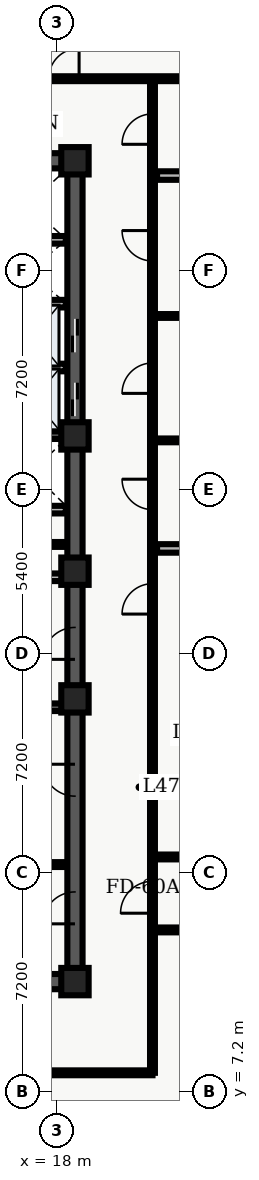
"""IFC4 building model, lengths in metres.
Left out: names, types, materials, properties, quantities, classifications, styles, units other than length and angle.
Written with IfcOpenShell. Run it as: python <this file> out.ifc"""

import sys

from ifc_helpers import new_model, entity, si_unit, converted_unit, direction, frame, origin_with_axes, origin_2d_with_axis, place, context, subcontext, project, spatial, polyline, rectangle, outline, extrude, element, fill, save


model = new_model("IFC4")
c1 = context("Model", 3, precision=1e-05, world=origin_with_axes(), true_north=direction((0.0, 1.0)))
c2 = subcontext(c1, "Body", "Model", "MODEL_VIEW")
j1 = project(units=[si_unit("LENGTHUNIT", "METRE"), converted_unit("PLANEANGLEUNIT", "DEGREE", entity("IfcPlaneAngleMeasure", 0.017), si_unit("PLANEANGLEUNIT", "RADIAN"), dimensions=[0, 0, 0, 0, 0, 0, 0])], contexts=[c1])
p1 = place(None, origin_with_axes())
s1 = spatial("IfcSite", under=j1, at=p1, CompositionType="ELEMENT")
p2 = place(p1, origin_with_axes())
s2 = spatial("IfcBuilding", under=s1, at=p2, CompositionType="ELEMENT")
p3 = place(p2, frame((0.0, 0.0, 192.6), z_axis=(0.0, 0.0, 1.0), x_axis=(1.0, 0.0, 0.0)))
s3 = spatial("IfcBuildingStorey", under=s2, at=p3, CompositionType="ELEMENT", Elevation=192.6)
p4 = place(p3, frame((11.4, 10.8, 0.0), z_axis=(0.0, 0.0, 1.0), x_axis=(1.0, 0.0, 0.0)))
e1 = element("IfcWall", 1, at=p4, inside=s3, PredefinedType="SHEAR", context=c2, shape_type="SweptSolid", body=[
    extrude(outline(polyline([(0.0, -0.25), (7.2, -0.25), (7.2, 0.25), (0.0, 0.25), (0.0, -0.25)])), origin_with_axes(), (0.0, 0.0, 1.0), 3.66),
])
p5 = place(p4, frame((2.625, 0.0, 0.0), z_axis=(0.0, 0.0, 1.0), x_axis=(1.0, 0.0, 0.0)))
e2 = element("IfcOpeningElement", 2, at=p5, cuts=e1, PredefinedType="OPENING", context=c2, shape_type="SweptSolid", body=[
    extrude(rectangle(XDim=1.05, YDim=0.52, at=origin_2d_with_axis()), origin_with_axes(), (0.0, 0.0, 1.0), 2.15),
])
p6 = place(p3, frame((11.4, 37.8, 0.0), z_axis=(0.0, 0.0, 1.0), x_axis=(1.0, 0.0, 0.0)))
e3 = element("IfcWall", 3, at=p6, inside=s3, PredefinedType="SHEAR", context=c2, shape_type="SweptSolid", body=[
    extrude(outline(polyline([(0.0, -0.25), (7.2, -0.25), (7.2, 0.25), (0.0, 0.25), (0.0, -0.25)])), origin_with_axes(), (0.0, 0.0, 1.0), 3.66),
])
p7 = place(p6, frame((2.625, 0.0, 0.0), z_axis=(0.0, 0.0, 1.0), x_axis=(1.0, 0.0, 0.0)))
e4 = element("IfcOpeningElement", 4, at=p7, cuts=e3, PredefinedType="OPENING", context=c2, shape_type="SweptSolid", body=[
    extrude(rectangle(XDim=1.05, YDim=0.52, at=origin_2d_with_axis()), origin_with_axes(), (0.0, 0.0, 1.0), 2.15),
])
p8 = place(p3, frame((18.6, 10.8, 0.0), z_axis=(0.0, 0.0, 1.0), x_axis=(0.0, 1.0, 0.0)))
e5 = element("IfcWall", 5, at=p8, inside=s3, PredefinedType="SHEAR", context=c2, shape_type="SweptSolid", body=[
    extrude(outline(polyline([(0.0, -0.25), (13.5, -0.25), (13.5, 0.25), (0.0, 0.25), (0.0, -0.25)])), origin_with_axes(), (0.0, 0.0, 1.0), 3.66),
])
p9 = place(p8, frame((11.125, 0.0, 0.0), z_axis=(0.0, 0.0, 1.0), x_axis=(1.0, 0.0, 0.0)))
e6 = element("IfcOpeningElement", 6, at=p9, cuts=e5, PredefinedType="OPENING", context=c2, shape_type="SweptSolid", body=[
    extrude(rectangle(XDim=1.05, YDim=0.52, at=origin_2d_with_axis()), origin_with_axes(), (0.0, 0.0, 1.0), 2.15),
])
p10 = place(p8, frame((2.425, 0.0, 0.0), z_axis=(0.0, 0.0, 1.0), x_axis=(1.0, 0.0, 0.0)))
e7 = element("IfcOpeningElement", 7, at=p10, cuts=e5, PredefinedType="OPENING", context=c2, shape_type="SweptSolid", body=[
    extrude(rectangle(XDim=1.05, YDim=0.52, at=origin_2d_with_axis()), origin_with_axes(), (0.0, 0.0, 1.0), 2.15),
])
p11 = place(p8, frame((6.625, 0.0, 0.0), z_axis=(0.0, 0.0, 1.0), x_axis=(1.0, 0.0, 0.0)))
e8 = element("IfcOpeningElement", 8, at=p11, cuts=e5, PredefinedType="OPENING", context=c2, shape_type="SweptSolid", body=[
    extrude(rectangle(XDim=1.05, YDim=0.52, at=origin_2d_with_axis()), origin_with_axes(), (0.0, 0.0, 1.0), 2.15),
])
p12 = place(p3, frame((18.6, 24.3, 0.0), z_axis=(0.0, 0.0, 1.0), x_axis=(0.0, 1.0, 0.0)))
e9 = element("IfcWall", 9, at=p12, inside=s3, PredefinedType="SHEAR", context=c2, shape_type="SweptSolid", body=[
    extrude(outline(polyline([(0.0, -0.25), (13.5, -0.25), (13.5, 0.25), (0.0, 0.25), (0.0, -0.25)])), origin_with_axes(), (0.0, 0.0, 1.0), 3.66),
])
p13 = place(p12, frame((5.65, 0.0, 0.0), z_axis=(0.0, 0.0, 1.0), x_axis=(1.0, 0.0, 0.0)))
e10 = element("IfcOpeningElement", 10, at=p13, cuts=e9, PredefinedType="OPENING", context=c2, shape_type="SweptSolid", body=[
    extrude(rectangle(XDim=1.1, YDim=0.52, at=origin_2d_with_axis()), origin_with_axes(), (0.0, 0.0, 1.0), 2.15),
])
p14 = place(p12, frame((7.75, 0.0, 0.0), z_axis=(0.0, 0.0, 1.0), x_axis=(1.0, 0.0, 0.0)))
e11 = element("IfcOpeningElement", 11, at=p14, cuts=e9, PredefinedType="OPENING", context=c2, shape_type="SweptSolid", body=[
    extrude(rectangle(XDim=1.1, YDim=0.52, at=origin_2d_with_axis()), origin_with_axes(), (0.0, 0.0, 1.0), 2.15),
])
for number, where, z_axis, x_axis in (
    (12, (11.65, 19.825, 0.0), (0.0, 0.0, 1.0), (1.0, 0.0, 0.0)),
    (13, (11.65, 28.775, 0.0), (0.0, 0.0, 1.0), (1.0, 0.0, 0.0)),
):
    element("IfcWall", number, at=place(p3, frame(where, z_axis=z_axis, x_axis=x_axis)), inside=s3, PredefinedType="SHEAR", context=c2, shape_type="SweptSolid", body=[
        extrude(outline(polyline([(0.0, -0.125), (6.7, -0.125), (6.7, 0.125), (0.0, 0.125), (0.0, -0.125)])), origin_with_axes(), (0.0, 0.0, 1.0), 3.66),
    ])
p15 = place(p3, frame((11.7, 24.1, 0.0), z_axis=(0.0, 0.0, 1.0), x_axis=(1.0, 0.0, 0.0)))
e14 = element("IfcWall", 14, at=p15, inside=s3, PredefinedType="SOLIDWALL", context=c2, shape_type="SweptSolid", body=[
    extrude(outline(polyline([(0.0, -0.125), (6.6, -0.125), (6.6, 0.125), (0.0, 0.125), (0.0, -0.125)])), origin_with_axes(), (0.0, 0.0, 1.0), 2.7),
])
p16 = place(p15, frame((3.75, 0.0, 0.0), z_axis=(0.0, 0.0, 1.0), x_axis=(1.0, 0.0, 0.0)))
e15 = element("IfcOpeningElement", 15, at=p16, cuts=e14, PredefinedType="OPENING", context=c2, shape_type="SweptSolid", body=[
    extrude(rectangle(XDim=0.9, YDim=0.27, at=origin_2d_with_axis()), origin_with_axes(), (0.0, 0.0, 1.0), 2.15),
])
p17 = place(p3, frame((11.7, 26.325, 0.0), z_axis=(0.0, 0.0, 1.0), x_axis=(1.0, 0.0, 0.0)))
e16 = element("IfcWall", 16, at=p17, inside=s3, PredefinedType="SOLIDWALL", context=c2, shape_type="SweptSolid", body=[
    extrude(outline(polyline([(0.0, -0.125), (6.6, -0.125), (6.6, 0.125), (0.0, 0.125), (0.0, -0.125)])), origin_with_axes(), (0.0, 0.0, 1.0), 2.7),
])
p18 = place(p17, frame((3.5, 0.0, 0.0), z_axis=(0.0, 0.0, 1.0), x_axis=(1.0, 0.0, 0.0)))
e17 = element("IfcOpeningElement", 17, at=p18, cuts=e16, PredefinedType="OPENING", context=c2, shape_type="SweptSolid", body=[
    extrude(rectangle(XDim=0.9, YDim=0.27, at=origin_2d_with_axis()), origin_with_axes(), (0.0, 0.0, 1.0), 2.15),
])
for number, where, z_axis, x_axis in (
    (18, (18.6, 10.8, 0.0), (0.0, 0.0, 1.0), (1.0, 0.0, 0.0)),
    (19, (18.6, 20.1, 0.0), (0.0, 0.0, 1.0), (1.0, 0.0, 0.0)),
    (20, (18.6, 24.3, 0.0), (0.0, 0.0, 1.0), (1.0, 0.0, 0.0)),
    (21, (18.6, 28.75, 0.0), (0.0, 0.0, 1.0), (1.0, 0.0, 0.0)),
    (22, (18.6, 37.8, 0.0), (0.0, 0.0, 1.0), (1.0, 0.0, 0.0)),
):
    element("IfcColumn", number, at=place(p3, frame(where, z_axis=z_axis, x_axis=x_axis)), inside=s3, PredefinedType="COLUMN", context=c2, shape_type="SweptSolid", body=[
        extrude(rectangle(XDim=0.9, YDim=0.9, at=origin_2d_with_axis()), origin_with_axes(), (0.0, 0.0, 1.0), 3.9),
    ])
p19 = place(p3, frame((14.62, 25.18, 0.0), z_axis=(0.0, 0.0, 1.0), x_axis=(1.0, 0.0, 0.0)))
e23 = element("IfcWall", 23, at=p19, inside=s3, PredefinedType="PARTITIONING", context=c2, shape_type="SweptSolid", body=[
    extrude(outline(polyline([(0.0, -0.08), (3.68, -0.08), (3.68, 0.08), (0.0, 0.08), (0.0, -0.08)])), origin_with_axes(), (0.0, 0.0, 1.0), 2.7),
])
p20 = place(p19, frame((1.95, 0.0, 0.0), z_axis=(0.0, 0.0, 1.0), x_axis=(1.0, 0.0, 0.0)))
e24 = element("IfcOpeningElement", 24, at=p20, cuts=e23, PredefinedType="OPENING", context=c2, shape_type="SweptSolid", body=[
    extrude(rectangle(XDim=0.9, YDim=0.18, at=origin_2d_with_axis()), origin_with_axes(), (0.0, 0.0, 1.0), 2.15),
])
p21 = place(p3, frame((15.84, 14.65, 0.0), z_axis=(0.0, 0.0, 1.0), x_axis=(1.0, 0.0, 0.0)))
e25 = element("IfcWall", 25, at=p21, inside=s3, PredefinedType="PARTITIONING", context=c2, shape_type="SweptSolid", body=[
    extrude(outline(polyline([(0.0, -0.08), (2.46, -0.08), (2.46, 0.08), (0.0, 0.08), (0.0, -0.08)])), origin_with_axes(), (0.0, 0.0, 1.0), 2.7),
])
for number, where, z_axis, x_axis in (
    (26, (15.84, 31.0, 0.0), (0.0, 0.0, 1.0), (1.0, 0.0, 0.0)),
    (27, (15.84, 33.1, 0.0), (0.0, 0.0, 1.0), (1.0, 0.0, 0.0)),
    (28, (15.84, 35.2, 0.0), (0.0, 0.0, 1.0), (1.0, 0.0, 0.0)),
):
    element("IfcWall", number, at=place(p3, frame(where, z_axis=z_axis, x_axis=x_axis)), inside=s3, PredefinedType="SOLIDWALL", context=c2, shape_type="SweptSolid", body=[
        extrude(outline(polyline([(0.0, -0.125), (2.46, -0.125), (2.46, 0.125), (0.0, 0.125), (0.0, -0.125)])), origin_with_axes(), (0.0, 0.0, 1.0), 2.7),
    ])
p22 = place(p3, frame((2.6, 7.8, 0.0), z_axis=(0.0, 0.0, 1.0), x_axis=(1.0, 0.0, 0.0)))
e29 = element("IfcWall", 29, at=p22, inside=s3, PredefinedType="PARTITIONING", context=c2, shape_type="SweptSolid", body=[
    extrude(outline(polyline([(0.0, -0.08), (18.55, -0.08), (18.55, 0.08), (0.0, 0.08), (0.0, -0.08)])), origin_with_axes(), (0.0, 0.0, 1.0), 2.7),
])
p23 = place(p22, frame((5.04, 0.0, 0.0), z_axis=(0.0, 0.0, 1.0), x_axis=(1.0, 0.0, 0.0)))
e30 = element("IfcOpeningElement", 30, at=p23, cuts=e29, PredefinedType="OPENING", context=c2, shape_type="SweptSolid", body=[
    extrude(rectangle(XDim=1.2, YDim=0.18, at=origin_2d_with_axis()), origin_with_axes(), (0.0, 0.0, 1.0), 2.2),
])
p24 = place(p22, frame((13.415, 0.0, 0.0), z_axis=(0.0, 0.0, 1.0), x_axis=(1.0, 0.0, 0.0)))
e31 = element("IfcOpeningElement", 31, at=p24, cuts=e29, PredefinedType="OPENING", context=c2, shape_type="SweptSolid", body=[
    extrude(rectangle(XDim=1.0, YDim=0.18, at=origin_2d_with_axis()), origin_with_axes(), (0.0, 0.0, 1.0), 2.15),
])
p25 = place(p3, frame((2.6, 40.5, 0.0), z_axis=(0.0, 0.0, 1.0), x_axis=(1.0, 0.0, 0.0)))
e32 = element("IfcWall", 32, at=p25, inside=s3, PredefinedType="PARTITIONING", context=c2, shape_type="SweptSolid", body=[
    extrude(outline(polyline([(0.0, -0.08), (24.746, -0.08), (24.746, 0.08), (0.0, 0.08), (0.0, -0.08)])), origin_with_axes(), (0.0, 0.0, 1.0), 2.7),
])
p26 = place(p25, frame((1.554, 0.0, 0.0), z_axis=(0.0, 0.0, 1.0), x_axis=(1.0, 0.0, 0.0)))
e33 = element("IfcOpeningElement", 33, at=p26, cuts=e32, PredefinedType="OPENING", context=c2, shape_type="SweptSolid", body=[
    extrude(rectangle(XDim=1.0, YDim=0.18, at=origin_2d_with_axis()), origin_with_axes(), (0.0, 0.0, 1.0), 2.15),
])
p27 = place(p25, frame((6.84, 0.0, 0.0), z_axis=(0.0, 0.0, 1.0), x_axis=(1.0, 0.0, 0.0)))
e34 = element("IfcOpeningElement", 34, at=p27, cuts=e32, PredefinedType="OPENING", context=c2, shape_type="SweptSolid", body=[
    extrude(rectangle(XDim=1.0, YDim=0.18, at=origin_2d_with_axis()), origin_with_axes(), (0.0, 0.0, 1.0), 2.15),
])
p28 = place(p25, frame((11.276, 0.0, 0.0), z_axis=(0.0, 0.0, 1.0), x_axis=(1.0, 0.0, 0.0)))
e35 = element("IfcOpeningElement", 35, at=p28, cuts=e32, PredefinedType="OPENING", context=c2, shape_type="SweptSolid", body=[
    extrude(rectangle(XDim=1.0, YDim=0.18, at=origin_2d_with_axis()), origin_with_axes(), (0.0, 0.0, 1.0), 2.15),
])
p29 = place(p25, frame((15.636, 0.0, 0.0), z_axis=(0.0, 0.0, 1.0), x_axis=(1.0, 0.0, 0.0)))
e36 = element("IfcOpeningElement", 36, at=p29, cuts=e32, PredefinedType="OPENING", context=c2, shape_type="SweptSolid", body=[
    extrude(rectangle(XDim=1.0, YDim=0.18, at=origin_2d_with_axis()), origin_with_axes(), (0.0, 0.0, 1.0), 2.15),
])
p30 = place(p3, frame((21.15, 7.8, 0.0), z_axis=(0.0, 0.0, 1.0), x_axis=(0.0, 1.0, 0.0)))
e37 = element("IfcWall", 37, at=p30, inside=s3, PredefinedType="PARTITIONING", context=c2, shape_type="SweptSolid", body=[
    extrude(outline(polyline([(0.0, -0.08), (32.7, -0.08), (32.7, 0.08), (0.0, 0.08), (0.0, -0.08)])), origin_with_axes(), (0.0, 0.0, 1.0), 2.7),
])
p31 = place(p30, frame((15.589, 0.0, 0.0), z_axis=(0.0, 0.0, 1.0), x_axis=(1.0, 0.0, 0.0)))
e38 = element("IfcOpeningElement", 38, at=p31, cuts=e37, PredefinedType="OPENING", context=c2, shape_type="SweptSolid", body=[
    extrude(rectangle(XDim=1.0, YDim=0.18, at=origin_2d_with_axis()), origin_with_axes(), (0.0, 0.0, 1.0), 2.15),
])
p32 = place(p30, frame((19.026, 0.0, 0.0), z_axis=(0.0, 0.0, 1.0), x_axis=(1.0, 0.0, 0.0)))
e39 = element("IfcOpeningElement", 39, at=p32, cuts=e37, PredefinedType="OPENING", context=c2, shape_type="SweptSolid", body=[
    extrude(rectangle(XDim=1.0, YDim=0.18, at=origin_2d_with_axis()), origin_with_axes(), (0.0, 0.0, 1.0), 2.15),
])
p33 = place(p30, frame((22.849, 0.0, 0.0), z_axis=(0.0, 0.0, 1.0), x_axis=(1.0, 0.0, 0.0)))
e40 = element("IfcOpeningElement", 40, at=p33, cuts=e37, PredefinedType="OPENING", context=c2, shape_type="SweptSolid", body=[
    extrude(rectangle(XDim=1.0, YDim=0.18, at=origin_2d_with_axis()), origin_with_axes(), (0.0, 0.0, 1.0), 2.15),
])
p34 = place(p30, frame((27.204, 0.0, 0.0), z_axis=(0.0, 0.0, 1.0), x_axis=(1.0, 0.0, 0.0)))
e41 = element("IfcOpeningElement", 41, at=p34, cuts=e37, PredefinedType="OPENING", context=c2, shape_type="SweptSolid", body=[
    extrude(rectangle(XDim=1.0, YDim=0.18, at=origin_2d_with_axis()), origin_with_axes(), (0.0, 0.0, 1.0), 2.15),
])
p35 = place(p30, frame((31.042, 0.0, 0.0), z_axis=(0.0, 0.0, 1.0), x_axis=(1.0, 0.0, 0.0)))
e42 = element("IfcOpeningElement", 42, at=p35, cuts=e37, PredefinedType="OPENING", context=c2, shape_type="SweptSolid", body=[
    extrude(rectangle(XDim=1.0, YDim=0.18, at=origin_2d_with_axis()), origin_with_axes(), (0.0, 0.0, 1.0), 2.15),
])
p36 = place(p30, frame((5.775, 0.0, 0.0), z_axis=(0.0, 0.0, 1.0), x_axis=(1.0, 0.0, 0.0)))
e43 = element("IfcOpeningElement", 43, at=p36, cuts=e37, PredefinedType="OPENING", context=c2, shape_type="SweptSolid", body=[
    extrude(rectangle(XDim=1.05, YDim=0.18, at=origin_2d_with_axis()), origin_with_axes(), (0.0, 0.0, 1.0), 2.15),
])
p37 = place(p3, frame((21.3, 25.049, 0.0), z_axis=(0.0, 0.0, 1.0), x_axis=(1.0, 0.0, 0.0)))
e44 = element("IfcWall", 44, at=p37, inside=s3, PredefinedType="PARTITIONING", context=c2, shape_type="SweptSolid", body=[
    extrude(outline(polyline([(0.0, -0.14), (6.046, -0.14), (6.046, 0.14), (0.0, 0.14), (0.0, -0.14)])), origin_with_axes(), (0.0, 0.0, 1.0), 2.7),
])
for number, where, z_axis, x_axis in (
    (45, (21.3, 28.603, 0.0), (0.0, 0.0, 1.0), (1.0, 0.0, 0.0)),
    (46, (21.3, 32.695, 0.0), (0.0, 0.0, 1.0), (1.0, 0.0, 0.0)),
):
    element("IfcWall", number, at=place(p3, frame(where, z_axis=z_axis, x_axis=x_axis)), inside=s3, PredefinedType="PARTITIONING", context=c2, shape_type="SweptSolid", body=[
        extrude(outline(polyline([(0.0, -0.062), (6.046, -0.062), (6.046, 0.062), (0.0, 0.062), (0.0, -0.062)])), origin_with_axes(), (0.0, 0.0, 1.0), 2.7),
    ])
p38 = place(p3, frame((21.3, 37.314, 0.0), z_axis=(0.0, 0.0, 1.0), x_axis=(1.0, 0.0, 0.0)))
e47 = element("IfcWall", 47, at=p38, inside=s3, PredefinedType="PARTITIONING", context=c2, shape_type="SweptSolid", body=[
    extrude(outline(polyline([(0.0, -0.14), (6.046, -0.14), (6.046, 0.14), (0.0, 0.14), (0.0, -0.14)])), origin_with_axes(), (0.0, 0.0, 1.0), 2.7),
])
p39 = place(p3, frame((21.15, 12.5, 0.0), z_axis=(0.0, 0.0, 1.0), x_axis=(1.0, 0.0, 0.0)))
e48 = element("IfcWall", 48, at=p39, inside=s3, PredefinedType="PARTITIONING", context=c2, shape_type="SweptSolid", body=[
    extrude(outline(polyline([(0.0, -0.08), (15.2, -0.08), (15.2, 0.08), (0.0, 0.08), (0.0, -0.08)])), origin_with_axes(), (0.0, 0.0, 1.0), 2.7),
])
p40 = place(p39, frame((1.762, 0.0, 0.0), z_axis=(0.0, 0.0, 1.0), x_axis=(1.0, 0.0, 0.0)))
e49 = element("IfcOpeningElement", 49, at=p40, cuts=e48, PredefinedType="OPENING", context=c2, shape_type="SweptSolid", body=[
    extrude(rectangle(XDim=1.0, YDim=0.18, at=origin_2d_with_axis()), origin_with_axes(), (0.0, 0.0, 1.0), 2.15),
])
p41 = place(p39, frame((4.897, 0.0, 0.0), z_axis=(0.0, 0.0, 1.0), x_axis=(1.0, 0.0, 0.0)))
e50 = element("IfcOpeningElement", 50, at=p41, cuts=e48, PredefinedType="OPENING", context=c2, shape_type="SweptSolid", body=[
    extrude(rectangle(XDim=1.0, YDim=0.18, at=origin_2d_with_axis()), origin_with_axes(), (0.0, 0.0, 1.0), 2.15),
])
p42 = place(p39, frame((8.527, 0.0, 0.0), z_axis=(0.0, 0.0, 1.0), x_axis=(1.0, 0.0, 0.0)))
e51 = element("IfcOpeningElement", 51, at=p42, cuts=e48, PredefinedType="OPENING", context=c2, shape_type="SweptSolid", body=[
    extrude(rectangle(XDim=1.0, YDim=0.18, at=origin_2d_with_axis()), origin_with_axes(), (0.0, 0.0, 1.0), 2.15),
])
p43 = place(p39, frame((12.863, 0.0, 0.0), z_axis=(0.0, 0.0, 1.0), x_axis=(1.0, 0.0, 0.0)))
e52 = element("IfcOpeningElement", 52, at=p43, cuts=e48, PredefinedType="OPENING", context=c2, shape_type="SweptSolid", body=[
    extrude(rectangle(XDim=1.0, YDim=0.18, at=origin_2d_with_axis()), origin_with_axes(), (0.0, 0.0, 1.0), 2.15),
])
p44 = place(p3, frame((21.15, 14.9, 0.0), z_axis=(0.0, 0.0, 1.0), x_axis=(1.0, 0.0, 0.0)))
e53 = element("IfcWall", 53, at=p44, inside=s3, PredefinedType="PARTITIONING", context=c2, shape_type="SweptSolid", body=[
    extrude(outline(polyline([(0.0, -0.08), (15.2, -0.08), (15.2, 0.08), (0.0, 0.08), (0.0, -0.08)])), origin_with_axes(), (0.0, 0.0, 1.0), 2.7),
])
p45 = place(p44, frame((7.65, 0.0, 0.0), z_axis=(0.0, 0.0, 1.0), x_axis=(1.0, 0.0, 0.0)))
e54 = element("IfcOpeningElement", 54, at=p45, cuts=e53, PredefinedType="OPENING", context=c2, shape_type="SweptSolid", body=[
    extrude(rectangle(XDim=1.2, YDim=0.18, at=origin_2d_with_axis()), origin_with_axes(), (0.0, 0.0, 1.0), 2.2),
])
p46 = place(p12, frame((5.65, 0.0, 0.0), z_axis=(0.0, 0.0, 1.0), x_axis=(1.0, 0.0, 0.0)))
e55 = element("IfcDoor", 55, at=p46, inside=s3, OperationType="SLIDING_TO_LEFT", PredefinedType="DOOR", context=c2, shape_type="SweptSolid", body=[
    extrude(rectangle(XDim=1.1, YDim=0.09, at=origin_2d_with_axis()), origin_with_axes(), (0.0, 0.0, 1.0), 2.15),
])
fill(e10, e55)
p47 = place(p12, frame((7.75, 0.0, 0.0), z_axis=(0.0, 0.0, 1.0), x_axis=(1.0, 0.0, 0.0)))
e56 = element("IfcDoor", 56, at=p47, inside=s3, OperationType="SLIDING_TO_RIGHT", PredefinedType="DOOR", context=c2, shape_type="SweptSolid", body=[
    extrude(rectangle(XDim=1.1, YDim=0.09, at=origin_2d_with_axis()), origin_with_axes(), (0.0, 0.0, 1.0), 2.15),
])
fill(e11, e56)
p48 = place(p8, frame((11.125, 0.0, 0.0), z_axis=(0.0, 0.0, 1.0), x_axis=(1.0, 0.0, 0.0)))
e57 = element("IfcDoor", 57, at=p48, inside=s3, OperationType="SINGLE_SWING_LEFT", PredefinedType="DOOR", context=c2, shape_type="SweptSolid", body=[
    extrude(rectangle(XDim=1.05, YDim=0.09, at=origin_2d_with_axis()), origin_with_axes(), (0.0, 0.0, 1.0), 2.15),
])
fill(e6, e57)
p49 = place(p8, frame((2.425, 0.0, 0.0), z_axis=(0.0, 0.0, 1.0), x_axis=(1.0, 0.0, 0.0)))
e58 = element("IfcDoor", 58, at=p49, inside=s3, OperationType="SINGLE_SWING_LEFT", PredefinedType="DOOR", context=c2, shape_type="SweptSolid", body=[
    extrude(rectangle(XDim=1.05, YDim=0.09, at=origin_2d_with_axis()), origin_with_axes(), (0.0, 0.0, 1.0), 2.15),
])
fill(e7, e58)
p50 = place(p8, frame((6.625, 0.0, 0.0), z_axis=(0.0, 0.0, 1.0), x_axis=(1.0, 0.0, 0.0)))
e59 = element("IfcDoor", 59, at=p50, inside=s3, OperationType="SINGLE_SWING_RIGHT", PredefinedType="DOOR", context=c2, shape_type="SweptSolid", body=[
    extrude(rectangle(XDim=1.05, YDim=0.09, at=origin_2d_with_axis()), origin_with_axes(), (0.0, 0.0, 1.0), 2.15),
])
fill(e8, e59)
p51 = place(p25, frame((15.636, 0.0, 0.0), z_axis=(0.0, 0.0, 1.0), x_axis=(1.0, 0.0, 0.0)))
e60 = element("IfcDoor", 60, at=p51, inside=s3, OperationType="SINGLE_SWING_RIGHT", PredefinedType="DOOR", context=c2, shape_type="SweptSolid", body=[
    extrude(rectangle(XDim=1.0, YDim=0.09, at=origin_2d_with_axis()), origin_with_axes(), (0.0, 0.0, 1.0), 2.15),
])
fill(e36, e60)
p52 = place(p30, frame((15.589, 0.0, 0.0), z_axis=(0.0, 0.0, 1.0), x_axis=(1.0, 0.0, 0.0)))
e61 = element("IfcDoor", 61, at=p52, inside=s3, OperationType="SINGLE_SWING_LEFT", PredefinedType="DOOR", context=c2, shape_type="SweptSolid", body=[
    extrude(rectangle(XDim=1.0, YDim=0.09, at=origin_2d_with_axis()), origin_with_axes(), (0.0, 0.0, 1.0), 2.15),
])
fill(e38, e61)
p53 = place(p30, frame((19.026, 0.0, 0.0), z_axis=(0.0, 0.0, 1.0), x_axis=(1.0, 0.0, 0.0)))
e62 = element("IfcDoor", 62, at=p53, inside=s3, OperationType="SINGLE_SWING_RIGHT", PredefinedType="DOOR", context=c2, shape_type="SweptSolid", body=[
    extrude(rectangle(XDim=1.0, YDim=0.09, at=origin_2d_with_axis()), origin_with_axes(), (0.0, 0.0, 1.0), 2.15),
])
fill(e39, e62)
p54 = place(p30, frame((22.849, 0.0, 0.0), z_axis=(0.0, 0.0, 1.0), x_axis=(1.0, 0.0, 0.0)))
e63 = element("IfcDoor", 63, at=p54, inside=s3, OperationType="SINGLE_SWING_LEFT", PredefinedType="DOOR", context=c2, shape_type="SweptSolid", body=[
    extrude(rectangle(XDim=1.0, YDim=0.09, at=origin_2d_with_axis()), origin_with_axes(), (0.0, 0.0, 1.0), 2.15),
])
fill(e40, e63)
p55 = place(p30, frame((27.204, 0.0, 0.0), z_axis=(0.0, 0.0, 1.0), x_axis=(1.0, 0.0, 0.0)))
e64 = element("IfcDoor", 64, at=p55, inside=s3, OperationType="SINGLE_SWING_RIGHT", PredefinedType="DOOR", context=c2, shape_type="SweptSolid", body=[
    extrude(rectangle(XDim=1.0, YDim=0.09, at=origin_2d_with_axis()), origin_with_axes(), (0.0, 0.0, 1.0), 2.15),
])
fill(e41, e64)
p56 = place(p30, frame((31.042, 0.0, 0.0), z_axis=(0.0, 0.0, 1.0), x_axis=(1.0, 0.0, 0.0)))
e65 = element("IfcDoor", 65, at=p56, inside=s3, OperationType="SINGLE_SWING_LEFT", PredefinedType="DOOR", context=c2, shape_type="SweptSolid", body=[
    extrude(rectangle(XDim=1.0, YDim=0.09, at=origin_2d_with_axis()), origin_with_axes(), (0.0, 0.0, 1.0), 2.15),
])
fill(e42, e65)
p57 = place(p30, frame((5.775, 0.0, 0.0), z_axis=(0.0, 0.0, 1.0), x_axis=(1.0, 0.0, 0.0)))
e66 = element("IfcDoor", 66, at=p57, inside=s3, OperationType="SINGLE_SWING_LEFT", PredefinedType="DOOR", context=c2, shape_type="SweptSolid", body=[
    extrude(rectangle(XDim=1.05, YDim=0.09, at=origin_2d_with_axis()), origin_with_axes(), (0.0, 0.0, 1.0), 2.15),
])
fill(e43, e66)
save(model, sys.argv[1])
